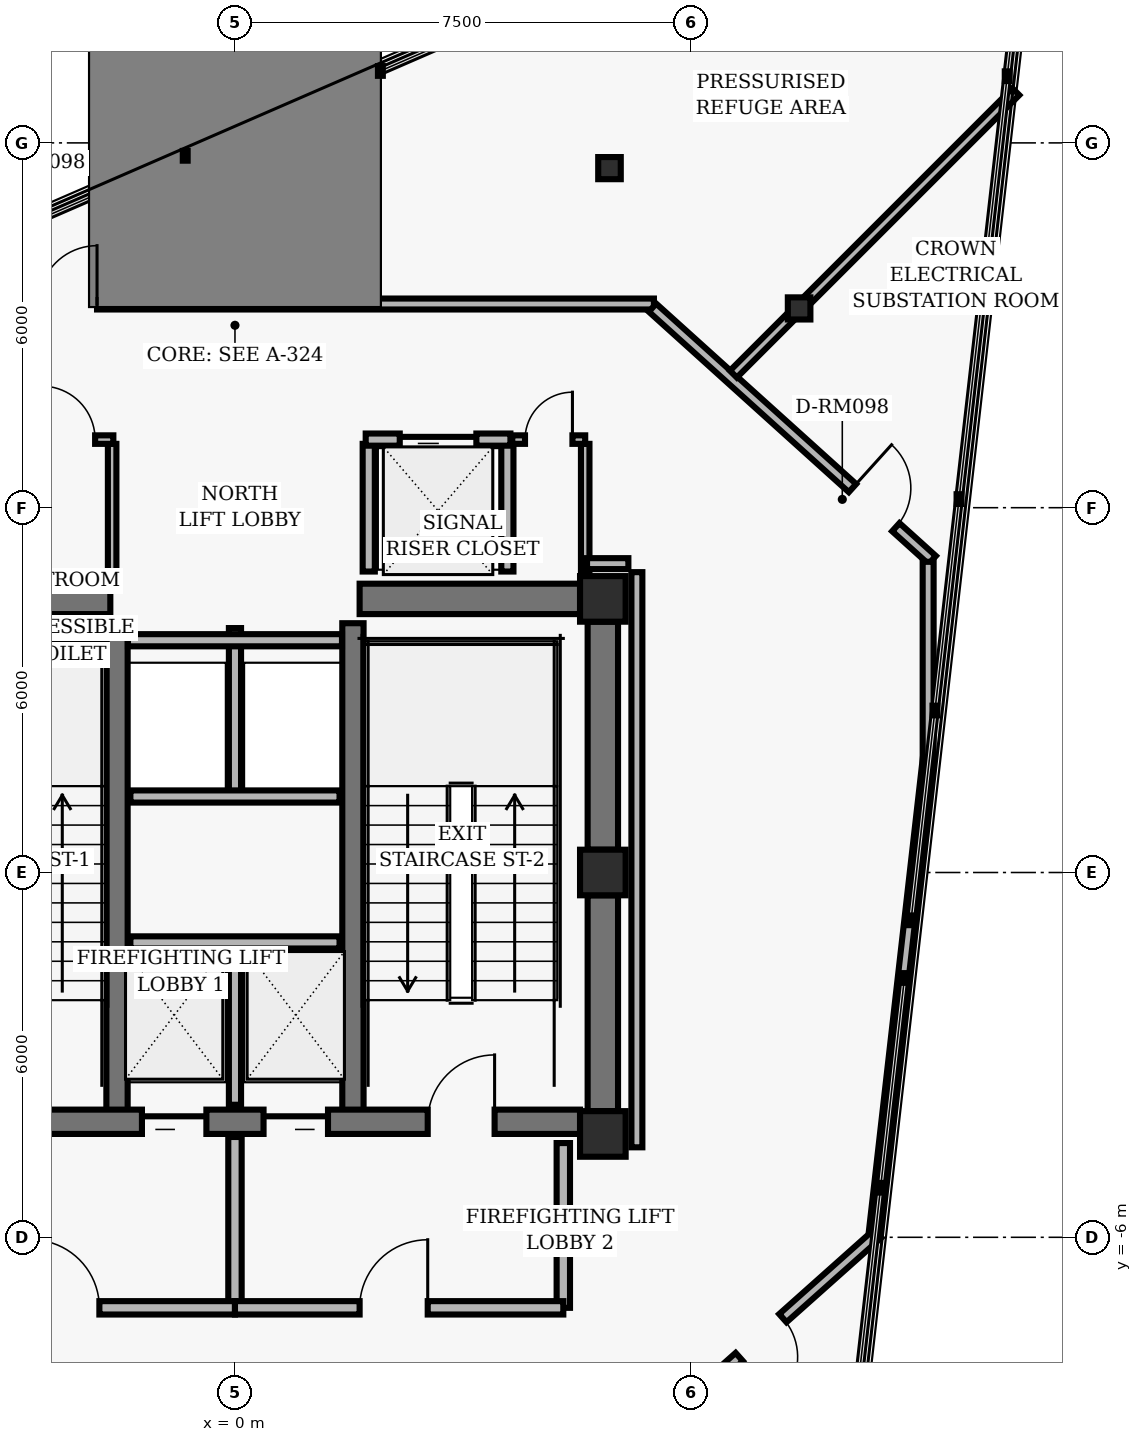
"""IFC4 building model, lengths in metres.
Left out: names, types, materials, properties, quantities, classifications, styles, units other than length and angle.
Written with IfcOpenShell. Run it as: python <this file> out.ifc"""

import sys

from ifc_helpers import new_model, si_unit, direction, frame, frame_2d, origin, origin_2d, place, context, subcontext, project, spatial, rectangle, hollow_rectangle, i_section, extrude, element, fill, save


model = new_model("IFC4")
c1 = context("Model", 3, precision=1e-05, world=origin(), true_north=direction((0.0, 1.0)))
c2 = subcontext(c1, "Body", "Model", "MODEL_VIEW")
j1 = project(units=[si_unit("LENGTHUNIT", "METRE"), si_unit("PLANEANGLEUNIT", "RADIAN")], contexts=[c1])
p1 = place(None, origin())
s1 = spatial("IfcSite", under=j1, at=p1, CompositionType="ELEMENT")
p2 = place(p1, origin())
s2 = spatial("IfcBuilding", under=s1, at=p2, CompositionType="ELEMENT")
p3 = place(p2, frame((0.0, 0.0, 239.2)))
s3 = spatial("IfcBuildingStorey", under=s2, at=p3, CompositionType="ELEMENT", Elevation=239.2)
for number, where, z_axis, x_axis in (
    (1, (6.05, 4.5, 0.0), (0.0, 0.0, 1.0), (1.0, 0.0, 0.0)),
    (2, (6.05, 0.0, 0.0), (0.0, 0.0, 1.0), (1.0, 0.0, 0.0)),
    (3, (6.05, -4.3, 0.0), (0.0, 0.0, 1.0), (1.0, 0.0, 0.0)),
):
    element("IfcColumn", number, at=place(p3, frame(where, z_axis=z_axis, x_axis=x_axis)), inside=s3, PredefinedType="COLUMN", context=c2, shape_type="SweptSolid", body=[
        extrude(hollow_rectangle(XDim=0.75, YDim=0.75, WallThickness=0.05, InnerFilletRadius=0.02, OuterFilletRadius=0.04, at=origin_2d()), origin(), (0.0, 0.0, 1.0), 4.16),
    ])
p4 = place(p3, frame((6.05, 0.375, 0.0), z_axis=(0.0, 0.0, 1.0), x_axis=(0.0, 1.0, 0.0)))
e4 = element("IfcWall", 4, at=p4, inside=s3, PredefinedType="SHEAR", context=c2, shape_type="SweptSolid", body=[
    extrude(rectangle(XDim=3.75, YDim=0.5, at=frame_2d((1.875, 0.0))), origin(), (0.0, 0.0, 1.0), 3.928),
])
p5 = place(p3, frame((6.05, -3.925, 0.0), z_axis=(0.0, 0.0, 1.0), x_axis=(0.0, 1.0, 0.0)))
e5 = element("IfcWall", 5, at=p5, inside=s3, PredefinedType="SHEAR", context=c2, shape_type="SweptSolid", body=[
    extrude(rectangle(XDim=3.55, YDim=0.5, at=frame_2d((1.775, 0.0))), origin(), (0.0, 0.0, 1.0), 3.928),
])
for number, where, z_axis, x_axis in (
    (6, (-1.94, -4.1, 0.0), (0.0, 0.0, 1.0), (0.0, 1.0, 0.0)),
    (7, (1.94, -4.1, 0.0), (0.0, 0.0, 1.0), (0.0, 1.0, 0.0)),
):
    element("IfcWall", number, at=place(p3, frame(where, z_axis=z_axis, x_axis=x_axis)), inside=s3, PredefinedType="SHEAR", context=c2, shape_type="SweptSolid", body=[
        extrude(rectangle(XDim=8.2, YDim=0.35, at=frame_2d((4.1, 0.0))), origin(), (0.0, 0.0, 1.0), 3.928),
    ])
p6 = place(p3, frame((-5.675, -4.1, 0.0), z_axis=(0.0, 0.0, 1.0), x_axis=(1.0, 0.0, 0.0)))
e8 = element("IfcWall", 8, at=p6, inside=s3, PredefinedType="SHEAR", context=c2, shape_type="SweptSolid", body=[
    extrude(rectangle(XDim=11.35, YDim=0.4, at=frame_2d((5.675, 0.0))), origin(), (0.0, 0.0, 1.0), 3.928),
])
p7 = place(p6, frame((1.405, 0.0, 0.0)))
e9 = element("IfcOpeningElement", 9, at=p7, cuts=e8, PredefinedType="OPENING", context=c2, shape_type="SweptSolid", body=[
    extrude(rectangle(XDim=1.1, YDim=2.04, at=frame_2d((0.55, 1.02))), frame((0.0, 0.21, 0.0), z_axis=(0.0, -1.0, 0.0), x_axis=(1.0, 0.0, 0.0)), (0.0, 0.0, 1.0), 0.42),
])
p8 = place(p6, frame((8.845, 0.0, 0.0)))
e10 = element("IfcOpeningElement", 10, at=p8, cuts=e8, PredefinedType="OPENING", context=c2, shape_type="SweptSolid", body=[
    extrude(rectangle(XDim=1.1, YDim=2.04, at=frame_2d((0.55, 1.02))), frame((0.0, 0.21, 0.0), z_axis=(0.0, -1.0, 0.0), x_axis=(1.0, 0.0, 0.0)), (0.0, 0.0, 1.0), 0.42),
])
p9 = place(p6, frame((4.145, 0.0, 0.0)))
e11 = element("IfcOpeningElement", 11, at=p9, cuts=e8, PredefinedType="OPENING", context=c2, shape_type="SweptSolid", body=[
    extrude(rectangle(XDim=1.06, YDim=2.04, at=frame_2d((0.53, 1.02))), frame((0.0, 0.21, 0.0), z_axis=(0.0, -1.0, 0.0), x_axis=(1.0, 0.0, 0.0)), (0.0, 0.0, 1.0), 0.42),
])
p10 = place(p6, frame((6.145, 0.0, 0.0)))
e12 = element("IfcOpeningElement", 12, at=p10, cuts=e8, PredefinedType="OPENING", context=c2, shape_type="SweptSolid", body=[
    extrude(rectangle(XDim=1.06, YDim=2.04, at=frame_2d((0.53, 1.02))), frame((0.0, 0.21, 0.0), z_axis=(0.0, -1.0, 0.0), x_axis=(1.0, 0.0, 0.0)), (0.0, 0.0, 1.0), 0.42),
])
for number, where, z_axis, x_axis in (
    (13, (-5.675, 4.5, 0.0), (0.0, 0.0, 1.0), (1.0, 0.0, 0.0)),
    (14, (2.05, 4.5, 0.0), (0.0, 0.0, 1.0), (1.0, 0.0, 0.0)),
):
    element("IfcWall", number, at=place(p3, frame(where, z_axis=z_axis, x_axis=x_axis)), inside=s3, PredefinedType="SHEAR", context=c2, shape_type="SweptSolid", body=[
        extrude(rectangle(XDim=3.625, YDim=0.5, at=frame_2d((1.812, 0.0))), origin(), (0.0, 0.0, 1.0), 3.928),
    ])
for number, where, z_axis, x_axis in (
    (15, (9.278, 9.277, 0.0), (0.0, 0.0, 1.0), (1.0, 0.0, 0.0)),
    (16, (6.159, 11.585, 0.0), (0.0, 0.0, 1.0), (1.0, 0.0, 0.0)),
):
    element("IfcColumn", number, at=place(p3, frame(where, z_axis=z_axis, x_axis=x_axis)), inside=s3, PredefinedType="COLUMN", context=c2, shape_type="SweptSolid", body=[
        extrude(i_section(OverallWidth=0.371, OverallDepth=0.364, WebThickness=0.013, FlangeThickness=0.022, FilletRadius=0.015, at=origin_2d()), origin(), (0.0, 0.0, 1.0), 4.16),
    ])
p11 = place(p3, frame((0.0, -3.82, 0.0), z_axis=(0.0, 0.0, 1.0), x_axis=(0.0, 1.0, 0.0)))
e17 = element("IfcWall", 17, at=p11, inside=s3, PredefinedType="PARTITIONING", context=c2, shape_type="SweptSolid", body=[
    extrude(rectangle(XDim=2.67, YDim=0.2, at=frame_2d((1.335, 0.0))), origin(), (0.0, 0.0, 1.0), 3.903),
])
p12 = place(p3, frame((-1.72, -1.15, 0.0), z_axis=(0.0, 0.0, 1.0), x_axis=(1.0, 0.0, 0.0)))
e18 = element("IfcWall", 18, at=p12, inside=s3, PredefinedType="PARTITIONING", context=c2, shape_type="SweptSolid", body=[
    extrude(rectangle(XDim=3.44, YDim=0.2, at=frame_2d((1.72, 0.0))), origin(), (0.0, 0.0, 1.0), 3.903),
])
p13 = place(p3, frame((5.4, -7.16, 0.0), z_axis=(0.0, 0.0, 1.0), x_axis=(0.0, 1.0, 0.0)))
e19 = element("IfcWall", 19, at=p13, inside=s3, PredefinedType="PARTITIONING", context=c2, shape_type="SweptSolid", body=[
    extrude(rectangle(XDim=2.71, YDim=0.22, at=frame_2d((1.355, 0.0))), origin(), (0.0, 0.0, 1.0), 3.903),
])
p14 = place(p3, frame((0.0, -7.16, 0.0), z_axis=(0.0, 0.0, 1.0), x_axis=(0.0, 1.0, 0.0)))
e20 = element("IfcWall", 20, at=p14, inside=s3, PredefinedType="PARTITIONING", context=c2, shape_type="SweptSolid", body=[
    extrude(rectangle(XDim=2.81, YDim=0.22, at=frame_2d((1.405, 0.0))), origin(), (0.0, 0.0, 1.0), 3.903),
])
p15 = place(p3, frame((-5.4, -7.16, 0.0), z_axis=(0.0, 0.0, 1.0), x_axis=(1.0, 0.0, 0.0)))
e21 = element("IfcWall", 21, at=p15, inside=s3, PredefinedType="PARTITIONING", context=c2, shape_type="SweptSolid", body=[
    extrude(rectangle(XDim=5.4, YDim=0.22, at=frame_2d((2.7, 0.0))), origin(), (0.0, 0.0, 1.0), 3.903),
])
p16 = place(p15, frame((2.05, 0.0, 0.0)))
e22 = element("IfcOpeningElement", 22, at=p16, cuts=e21, PredefinedType="OPENING", context=c2, shape_type="SweptSolid", body=[
    extrude(rectangle(XDim=1.12, YDim=2.02, at=frame_2d((0.56, 1.01))), frame((0.0, 0.12, 0.0), z_axis=(0.0, -1.0, 0.0), x_axis=(1.0, 0.0, 0.0)), (0.0, 0.0, 1.0), 0.24),
])
p17 = place(p3, frame((0.0, -7.16, 0.0), z_axis=(0.0, 0.0, 1.0), x_axis=(1.0, 0.0, 0.0)))
e23 = element("IfcWall", 23, at=p17, inside=s3, PredefinedType="PARTITIONING", context=c2, shape_type="SweptSolid", body=[
    extrude(rectangle(XDim=5.4, YDim=0.22, at=frame_2d((2.7, 0.0))), origin(), (0.0, 0.0, 1.0), 3.903),
])
p18 = place(p17, frame((2.05, 0.0, 0.0)))
e24 = element("IfcOpeningElement", 24, at=p18, cuts=e23, PredefinedType="OPENING", context=c2, shape_type="SweptSolid", body=[
    extrude(rectangle(XDim=1.12, YDim=2.02, at=frame_2d((0.56, 1.01))), frame((0.0, 0.12, 0.0), z_axis=(0.0, -1.0, 0.0), x_axis=(1.0, 0.0, 0.0)), (0.0, 0.0, 1.0), 0.24),
])
p19 = place(p3, frame((0.0, 1.25, 0.0), z_axis=(0.0, 0.0, 1.0), x_axis=(0.0, 1.0, 0.0)))
e25 = element("IfcWall", 25, at=p19, inside=s3, PredefinedType="PARTITIONING", context=c2, shape_type="SweptSolid", body=[
    extrude(rectangle(XDim=2.77, YDim=0.2, at=frame_2d((1.385, 0.0))), origin(), (0.0, 0.0, 1.0), 3.903),
])
p20 = place(p3, frame((-1.72, 1.25, 0.0), z_axis=(0.0, 0.0, 1.0), x_axis=(1.0, 0.0, 0.0)))
e26 = element("IfcWall", 26, at=p20, inside=s3, PredefinedType="PARTITIONING", context=c2, shape_type="SweptSolid", body=[
    extrude(rectangle(XDim=3.44, YDim=0.2, at=frame_2d((1.72, 0.0))), origin(), (0.0, 0.0, 1.0), 3.903),
])
p21 = place(p3, frame((-1.76, 3.82, 0.0), z_axis=(0.0, 0.0, 1.0), x_axis=(1.0, 0.0, 0.0)))
e27 = element("IfcWall", 27, at=p21, inside=s3, PredefinedType="PARTITIONING", context=c2, shape_type="SweptSolid", body=[
    extrude(rectangle(XDim=3.52, YDim=0.2, at=frame_2d((1.76, 0.0))), origin(), (0.0, 0.0, 1.0), 3.903),
])
for number, where, z_axis, x_axis in (
    (28, (2.2, 4.95, 0.0), (0.0, 0.0, 1.0), (0.0, 1.0, 0.0)),
    (29, (4.48, 4.95, 0.0), (0.0, 0.0, 1.0), (0.0, 1.0, 0.0)),
):
    element("IfcWall", number, at=place(p3, frame(where, z_axis=z_axis, x_axis=x_axis)), inside=s3, PredefinedType="PARTITIONING", context=c2, shape_type="SweptSolid", body=[
        extrude(rectangle(XDim=2.1, YDim=0.2, at=frame_2d((1.05, 0.0))), origin(), (0.0, 0.0, 1.0), 3.903),
    ])
p22 = place(p3, frame((2.15, 7.12, 0.0), z_axis=(0.0, 0.0, 1.0), x_axis=(1.0, 0.0, 0.0)))
e30 = element("IfcWall", 30, at=p22, inside=s3, PredefinedType="PARTITIONING", context=c2, shape_type="SweptSolid", body=[
    extrude(rectangle(XDim=2.38, YDim=0.2, at=frame_2d((1.19, 0.0))), origin(), (0.0, 0.0, 1.0), 3.903),
])
p23 = place(p22, frame((0.56, 0.0, 0.0)))
e31 = element("IfcOpeningElement", 31, at=p23, cuts=e30, PredefinedType="OPENING", context=c2, shape_type="SweptSolid", body=[
    extrude(rectangle(XDim=1.26, YDim=2.06, at=frame_2d((0.63, 1.03))), frame((0.0, 0.11, 0.0), z_axis=(0.0, -1.0, 0.0), x_axis=(1.0, 0.0, 0.0)), (0.0, 0.0, 1.0), 0.22),
])
p24 = place(p3, frame((-2.02, 4.95, 0.0), z_axis=(0.0, 0.0, 1.0), x_axis=(0.0, 1.0, 0.0)))
e32 = element("IfcWall", 32, at=p24, inside=s3, PredefinedType="PARTITIONING", context=c2, shape_type="SweptSolid", body=[
    extrude(rectangle(XDim=2.1, YDim=0.14, at=frame_2d((1.05, 0.0))), origin(), (0.0, 0.0, 1.0), 3.903),
])
p25 = place(p3, frame((-5.52, 7.12, 0.0), z_axis=(0.0, 0.0, 1.0), x_axis=(1.0, 0.0, 0.0)))
e33 = element("IfcWall", 33, at=p25, inside=s3, PredefinedType="PARTITIONING", context=c2, shape_type="SweptSolid", body=[
    extrude(rectangle(XDim=3.52, YDim=0.14, at=frame_2d((1.76, 0.0))), origin(), (0.0, 0.0, 1.0), 3.903),
])
p26 = place(p25, frame((0.14, 0.0, 0.0)))
e34 = element("IfcOpeningElement", 34, at=p26, cuts=e33, PredefinedType="OPENING", context=c2, shape_type="SweptSolid", body=[
    extrude(rectangle(XDim=0.78, YDim=2.01, at=frame_2d((0.39, 1.005))), frame((0.0, 0.08, 0.0), z_axis=(0.0, -1.0, 0.0), x_axis=(1.0, 0.0, 0.0)), (0.0, 0.0, 1.0), 0.16),
])
p27 = place(p25, frame((1.15, 0.0, 0.0)))
e35 = element("IfcOpeningElement", 35, at=p27, cuts=e33, PredefinedType="OPENING", context=c2, shape_type="SweptSolid", body=[
    extrude(rectangle(XDim=0.78, YDim=2.01, at=frame_2d((0.39, 1.005))), frame((0.0, 0.08, 0.0), z_axis=(0.0, -1.0, 0.0), x_axis=(1.0, 0.0, 0.0)), (0.0, 0.0, 1.0), 0.16),
])
p28 = place(p25, frame((2.34, 0.0, 0.0)))
e36 = element("IfcOpeningElement", 36, at=p28, cuts=e33, PredefinedType="OPENING", context=c2, shape_type="SweptSolid", body=[
    extrude(rectangle(XDim=0.88, YDim=2.02, at=frame_2d((0.44, 1.01))), frame((0.0, 0.08, 0.0), z_axis=(0.0, -1.0, 0.0), x_axis=(1.0, 0.0, 0.0)), (0.0, 0.0, 1.0), 0.16),
])
p29 = place(p3, frame((5.76, 4.95, 0.0), z_axis=(0.0, 0.0, 1.0), x_axis=(0.0, 1.0, 0.0)))
e37 = element("IfcWall", 37, at=p29, inside=s3, PredefinedType="PARTITIONING", context=c2, shape_type="SweptSolid", body=[
    extrude(rectangle(XDim=2.1, YDim=0.14, at=frame_2d((1.05, 0.0))), origin(), (0.0, 0.0, 1.0), 3.433),
])
p30 = place(p3, frame((4.56, 7.12, 0.0), z_axis=(0.0, 0.0, 1.0), x_axis=(1.0, 0.0, 0.0)))
e38 = element("IfcWall", 38, at=p30, inside=s3, PredefinedType="PARTITIONING", context=c2, shape_type="SweptSolid", body=[
    extrude(rectangle(XDim=1.2, YDim=0.14, at=frame_2d((0.6, 0.0))), origin(), (0.0, 0.0, 1.0), 3.903),
])
p31 = place(p30, frame((0.21, 0.0, 0.0)))
e39 = element("IfcOpeningElement", 39, at=p31, cuts=e38, PredefinedType="OPENING", context=c2, shape_type="SweptSolid", body=[
    extrude(rectangle(XDim=0.78, YDim=2.01, at=frame_2d((0.39, 1.005))), frame((0.0, 0.08, 0.0), z_axis=(0.0, -1.0, 0.0), x_axis=(1.0, 0.0, 0.0)), (0.0, 0.0, 1.0), 0.16),
])
p32 = place(p3, frame((-6.394, 9.35, 0.0), z_axis=(0.0, 0.0, 1.0), x_axis=(1.0, 0.0, 0.0)))
e40 = element("IfcWall", 40, at=p32, inside=s3, PredefinedType="PARTITIONING", context=c2, shape_type="SweptSolid", body=[
    extrude(rectangle(XDim=13.284, YDim=0.18, at=frame_2d((6.642, 0.0))), origin(), (0.0, 0.0, 1.0), 3.903),
])
p33 = place(p32, frame((3.166, 0.0, 0.0)))
e41 = element("IfcOpeningElement", 41, at=p33, cuts=e40, PredefinedType="OPENING", context=c2, shape_type="SweptSolid", body=[
    extrude(rectangle(XDim=0.96, YDim=2.02, at=frame_2d((0.48, 1.01))), frame((0.0, 0.1, 0.0), z_axis=(0.0, -1.0, 0.0), x_axis=(1.0, 0.0, 0.0)), (0.0, 0.0, 1.0), 0.2),
])
p34 = place(p3, frame((6.867, 9.29, 0.0), z_axis=(0.0, 0.0, 1.0), x_axis=(0.742486327971, -0.669861219042, 0.0)))
e42 = element("IfcWall", 42, at=p34, inside=s3, PredefinedType="PARTITIONING", context=c2, shape_type="SweptSolid", body=[
    extrude(rectangle(XDim=6.196, YDim=0.18, at=frame_2d((3.098, 0.0))), origin(), (0.0, 0.0, 1.0), 3.903),
])
p35 = place(p34, frame((4.429, 0.0, 0.0)))
e43 = element("IfcOpeningElement", 43, at=p35, cuts=e42, PredefinedType="OPENING", context=c2, shape_type="SweptSolid", body=[
    extrude(rectangle(XDim=0.96, YDim=2.02, at=frame_2d((0.48, 1.01))), frame((0.0, 0.1, 0.0), z_axis=(0.0, -1.0, 0.0), x_axis=(1.0, 0.0, 0.0)), (0.0, 0.0, 1.0), 0.2),
])
p36 = place(p3, frame((11.4, 5.11, 0.0), z_axis=(0.0, 0.0, 1.0), x_axis=(0.0, -1.0, 0.0)))
e44 = element("IfcWall", 44, at=p36, inside=s3, PredefinedType="PARTITIONING", context=c2, shape_type="SweptSolid", body=[
    extrude(rectangle(XDim=3.269, YDim=0.18, at=frame_2d((1.635, 0.0))), origin(), (0.0, 0.0, 1.0), 3.903),
])
p37 = place(p3, frame((11.402, 1.881, 0.0), z_axis=(0.0, 0.0, 1.0), x_axis=(-0.113226899453, -0.993569156748, 0.0)))
e45 = element("IfcWall", 45, at=p37, inside=s3, PredefinedType="PARTITIONING", context=c2, shape_type="SweptSolid", body=[
    extrude(rectangle(XDim=7.84, YDim=0.18, at=frame_2d((3.92, 0.0))), origin(), (0.0, 0.0, 1.0), 3.903),
])
p38 = place(p3, frame((10.572, -5.938, 0.0), z_axis=(0.0, 0.0, 1.0), x_axis=(-0.746510195803, -0.665373975717, 0.0)))
e46 = element("IfcWall", 46, at=p38, inside=s3, PredefinedType="PARTITIONING", context=c2, shape_type="SweptSolid", body=[
    extrude(rectangle(XDim=5.142, YDim=0.18, at=frame_2d((2.571, 0.0))), origin(), (0.0, 0.0, 1.0), 3.903),
])
p39 = place(p38, frame((2.091, 0.0, 0.0)))
e47 = element("IfcOpeningElement", 47, at=p39, cuts=e46, PredefinedType="OPENING", context=c2, shape_type="SweptSolid", body=[
    extrude(rectangle(XDim=0.96, YDim=2.02, at=frame_2d((0.48, 1.01))), frame((0.0, 0.1, 0.0), z_axis=(0.0, -1.0, 0.0), x_axis=(1.0, 0.0, 0.0)), (0.0, 0.0, 1.0), 0.2),
])
p40 = place(p3, frame((6.61, -4.52, 0.0), z_axis=(0.0, 0.0, 1.0), x_axis=(0.0, 1.0, 0.0)))
e48 = element("IfcWall", 48, at=p40, inside=s3, PredefinedType="PARTITIONING", context=c2, shape_type="SweptSolid", body=[
    extrude(rectangle(XDim=9.46, YDim=0.18, at=frame_2d((4.73, 0.0))), origin(), (0.0, 0.0, 1.0), 3.903),
])
p41 = place(p3, frame((6.47, 5.08, 0.0), z_axis=(0.0, 0.0, 1.0), x_axis=(-1.0, 0.0, 0.0)))
e49 = element("IfcWall", 49, at=p41, inside=s3, PredefinedType="PARTITIONING", context=c2, shape_type="SweptSolid", body=[
    extrude(rectangle(XDim=0.68, YDim=0.18, at=frame_2d((0.34, 0.0))), origin(), (0.0, 0.0, 1.0), 3.903),
])
p42 = place(p3, frame((8.197, 8.197, 0.0), z_axis=(0.0, 0.0, 1.0), x_axis=(0.707106781187, 0.707106781187, 0.0)))
e50 = element("IfcWall", 50, at=p42, inside=s3, PredefinedType="PARTITIONING", context=c2, shape_type="SweptSolid", body=[
    extrude(rectangle(XDim=6.569, YDim=0.16, at=frame_2d((3.285, 0.0))), origin(), (0.0, 0.0, 1.0), 3.433),
])
p43 = place(p8, origin())
e51 = element("IfcDoor", 51, at=p43, inside=s3, OperationType="SINGLE_SWING_RIGHT", PredefinedType="DOOR", context=c2, shape_type="SweptSolid", body=[
    extrude(rectangle(XDim=1.1, YDim=2.04, at=frame_2d((0.55, 1.02))), frame((0.0, 0.025, 0.0), z_axis=(0.0, -1.0, 0.0), x_axis=(1.0, 0.0, 0.0)), (0.0, 0.0, 1.0), 0.05),
])
fill(e10, e51)
p44 = place(p9, origin())
e52 = element("IfcDoor", 52, at=p44, inside=s3, OperationType="SLIDING_TO_LEFT", PredefinedType="DOOR", context=c2, shape_type="SweptSolid", body=[
    extrude(rectangle(XDim=1.06, YDim=2.04, at=frame_2d((0.53, 1.02))), frame((0.0, 0.025, 0.0), z_axis=(0.0, -1.0, 0.0), x_axis=(1.0, 0.0, 0.0)), (0.0, 0.0, 1.0), 0.05),
])
fill(e11, e52)
p45 = place(p10, origin())
e53 = element("IfcDoor", 53, at=p45, inside=s3, OperationType="SLIDING_TO_RIGHT", PredefinedType="DOOR", context=c2, shape_type="SweptSolid", body=[
    extrude(rectangle(XDim=1.06, YDim=2.04, at=frame_2d((0.53, 1.02))), frame((0.0, 0.025, 0.0), z_axis=(0.0, -1.0, 0.0), x_axis=(1.0, 0.0, 0.0)), (0.0, 0.0, 1.0), 0.05),
])
fill(e12, e53)
p46 = place(p16, origin())
e54 = element("IfcDoor", 54, at=p46, inside=s3, OperationType="SINGLE_SWING_LEFT", PredefinedType="DOOR", context=c2, shape_type="SweptSolid", body=[
    extrude(rectangle(XDim=1.12, YDim=2.02, at=frame_2d((0.56, 1.01))), frame((0.0, 0.025, 0.0), z_axis=(0.0, -1.0, 0.0), x_axis=(1.0, 0.0, 0.0)), (0.0, 0.0, 1.0), 0.05),
])
fill(e22, e54)
p47 = place(p18, origin())
e55 = element("IfcDoor", 55, at=p47, inside=s3, OperationType="SINGLE_SWING_RIGHT", PredefinedType="DOOR", context=c2, shape_type="SweptSolid", body=[
    extrude(rectangle(XDim=1.12, YDim=2.02, at=frame_2d((0.56, 1.01))), frame((0.0, 0.025, 0.0), z_axis=(0.0, -1.0, 0.0), x_axis=(1.0, 0.0, 0.0)), (0.0, 0.0, 1.0), 0.05),
])
fill(e24, e55)
p48 = place(p23, origin())
e56 = element("IfcDoor", 56, at=p48, inside=s3, OperationType="SLIDING_TO_LEFT", PredefinedType="DOOR", context=c2, shape_type="SweptSolid", body=[
    extrude(rectangle(XDim=1.26, YDim=2.06, at=frame_2d((0.63, 1.03))), frame((0.0, 0.025, 0.0), z_axis=(0.0, -1.0, 0.0), x_axis=(1.0, 0.0, 0.0)), (0.0, 0.0, 1.0), 0.05),
])
fill(e31, e56)
p49 = place(p28, origin())
e57 = element("IfcDoor", 57, at=p49, inside=s3, OperationType="SINGLE_SWING_LEFT", PredefinedType="DOOR", context=c2, shape_type="SweptSolid", body=[
    extrude(rectangle(XDim=0.88, YDim=2.02, at=frame_2d((0.44, 1.01))), frame((0.0, 0.025, 0.0), z_axis=(0.0, -1.0, 0.0), x_axis=(1.0, 0.0, 0.0)), (0.0, 0.0, 1.0), 0.05),
])
fill(e36, e57)
p50 = place(p31, origin())
e58 = element("IfcDoor", 58, at=p50, inside=s3, OperationType="SINGLE_SWING_RIGHT", PredefinedType="DOOR", context=c2, shape_type="SweptSolid", body=[
    extrude(rectangle(XDim=0.78, YDim=2.01, at=frame_2d((0.39, 1.005))), frame((0.0, 0.025, 0.0), z_axis=(0.0, -1.0, 0.0), x_axis=(1.0, 0.0, 0.0)), (0.0, 0.0, 1.0), 0.05),
])
fill(e39, e58)
p51 = place(p39, origin())
e59 = element("IfcDoor", 59, at=p51, inside=s3, OperationType="SINGLE_SWING_RIGHT", PredefinedType="DOOR", context=c2, shape_type="SweptSolid", body=[
    extrude(rectangle(XDim=0.96, YDim=2.02, at=frame_2d((0.48, 1.01))), frame((0.0, 0.025, 0.0), z_axis=(0.0, -1.0, 0.0), x_axis=(1.0, 0.0, 0.0)), (0.0, 0.0, 1.0), 0.05),
])
fill(e47, e59)
p52 = place(p35, origin())
e60 = element("IfcDoor", 60, at=p52, inside=s3, OperationType="SINGLE_SWING_LEFT", PredefinedType="DOOR", context=c2, shape_type="SweptSolid", body=[
    extrude(rectangle(XDim=0.96, YDim=2.02, at=frame_2d((0.48, 1.01))), frame((0.0, 0.025, 0.0), z_axis=(0.0, -1.0, 0.0), x_axis=(1.0, 0.0, 0.0)), (0.0, 0.0, 1.0), 0.05),
])
fill(e43, e60)
p53 = place(p33, origin())
e61 = element("IfcDoor", 61, at=p53, inside=s3, OperationType="SINGLE_SWING_RIGHT", PredefinedType="DOOR", context=c2, shape_type="SweptSolid", body=[
    extrude(rectangle(XDim=0.96, YDim=2.02, at=frame_2d((0.48, 1.01))), frame((0.0, 0.025, 0.0), z_axis=(0.0, -1.0, 0.0), x_axis=(1.0, 0.0, 0.0)), (0.0, 0.0, 1.0), 0.05),
])
fill(e41, e61)
save(model, sys.argv[1])
